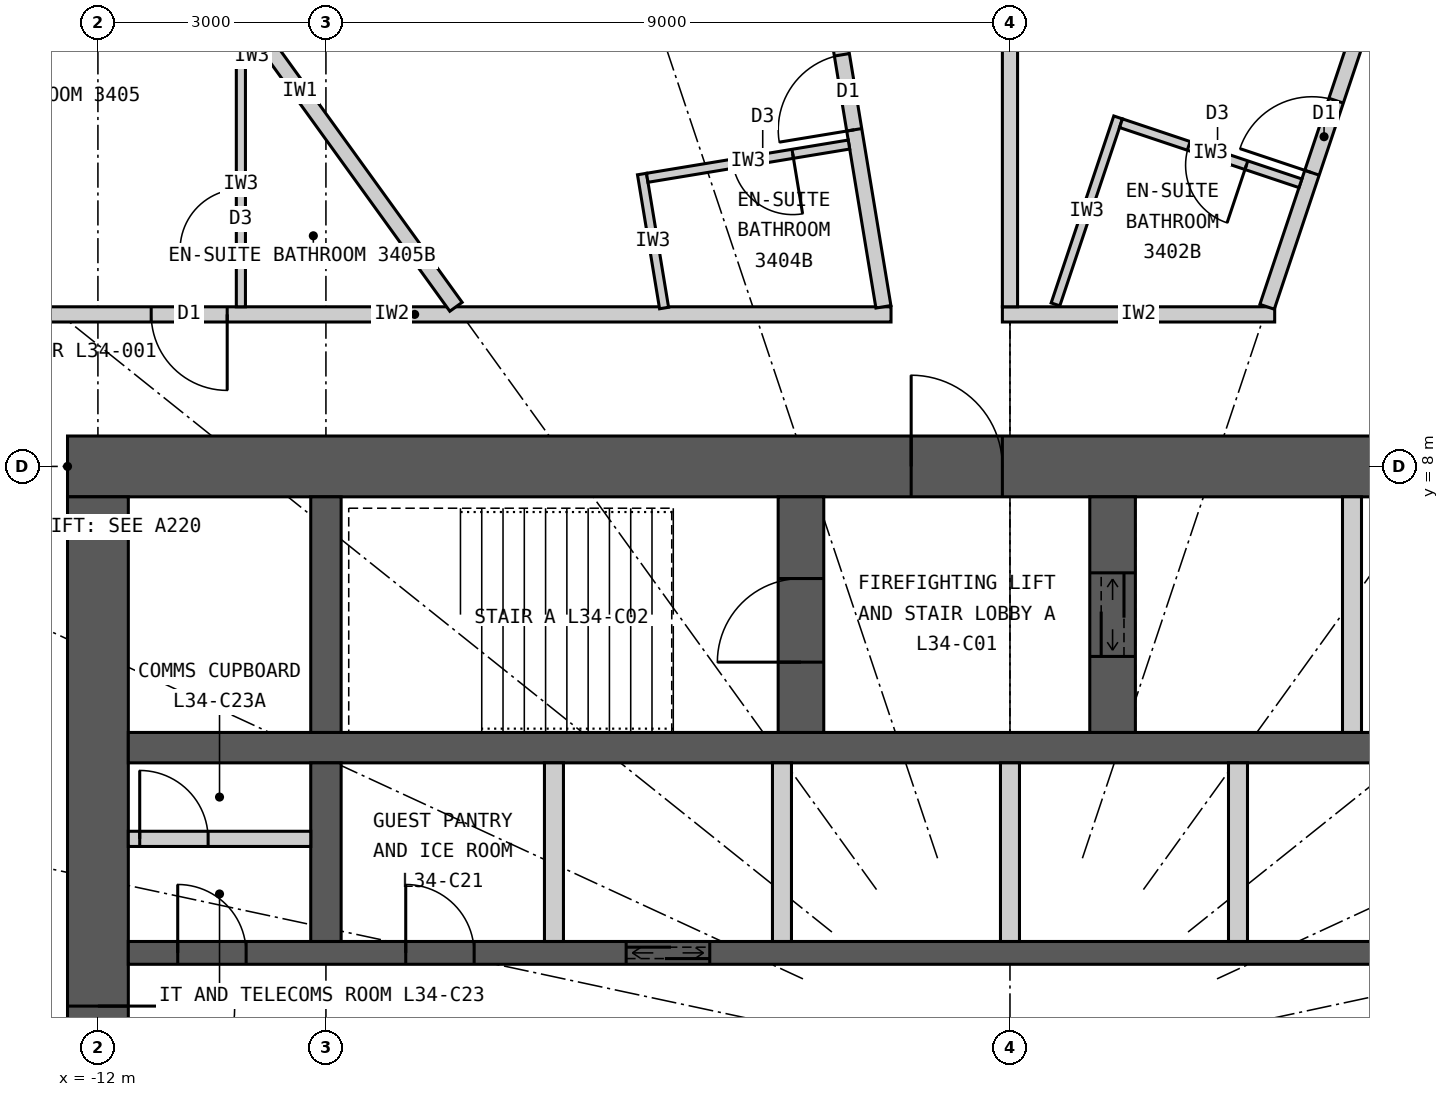
"""IFC4 building model, lengths in metres.
Left out: names, types, materials, properties, quantities, classifications, styles, units other than length and angle.
Written with IfcOpenShell. Run it as: python <this file> out.ifc"""

import sys

from ifc_helpers import new_model, si_unit, direction, frame, frame_2d, origin, place, context, subcontext, project, spatial, rectangle, extrude, element, fill, save


model = new_model("IFC4")
c1 = context("Model", 3, precision=1e-05, world=origin(), true_north=direction((0.0, 1.0)))
c2 = subcontext(c1, "Body", "Model", "MODEL_VIEW")
j1 = project(units=[si_unit("LENGTHUNIT", "METRE"), si_unit("PLANEANGLEUNIT", "RADIAN")], contexts=[c1])
p1 = place(None, origin())
s1 = spatial("IfcSite", under=j1, at=p1, CompositionType="ELEMENT")
p2 = place(p1, origin())
s2 = spatial("IfcBuilding", under=s1, at=p2, CompositionType="ELEMENT")
p3 = place(p2, frame((0.0, 0.0, 132.0)))
s3 = spatial("IfcBuildingStorey", under=s2, at=p3, CompositionType="ELEMENT", Elevation=132.0)
p4 = place(p3, frame((-12.4, 8.0, 0.0), z_axis=(0.0, 0.0, 1.0), x_axis=(1.0, 0.0, 0.0)))
e1 = element("IfcWall", 1, at=p4, inside=s3, PredefinedType="SHEAR", context=c2, shape_type="SweptSolid", body=[
    extrude(rectangle(XDim=24.8, YDim=0.8, at=frame_2d((12.4, 0.0))), origin(), (0.0, 0.0, 1.0), 3.3),
])
p5 = place(p4, frame((11.1, 0.0, 0.0)))
e2 = element("IfcOpeningElement", 2, at=p5, cuts=e1, PredefinedType="OPENING", context=c2, shape_type="SweptSolid", body=[
    extrude(rectangle(XDim=1.2, YDim=2.2, at=frame_2d((0.6, 1.1))), frame((0.0, 0.41, 0.0), z_axis=(0.0, -1.0, 0.0), x_axis=(1.0, 0.0, 0.0)), (0.0, 0.0, 1.0), 0.82),
])
p6 = place(p4, frame((18.7, 0.0, 0.0)))
e3 = element("IfcOpeningElement", 3, at=p6, cuts=e1, PredefinedType="OPENING", context=c2, shape_type="SweptSolid", body=[
    extrude(rectangle(XDim=0.9, YDim=2.2, at=frame_2d((0.45, 1.1))), frame((0.0, 0.41, 0.0), z_axis=(0.0, -1.0, 0.0), x_axis=(1.0, 0.0, 0.0)), (0.0, 0.0, 1.0), 0.82),
])
p7 = place(p3, frame((-12.0, 7.6, 0.0), z_axis=(0.0, 0.0, 1.0), x_axis=(0.0, -1.0, 0.0)))
e4 = element("IfcWall", 4, at=p7, inside=s3, PredefinedType="SHEAR", context=c2, shape_type="SweptSolid", body=[
    extrude(rectangle(XDim=15.2, YDim=0.8, at=frame_2d((7.6, 0.0))), origin(), (0.0, 0.0, 1.0), 3.3),
])
p8 = place(p7, frame((6.7, 0.0, 0.0)))
e5 = element("IfcOpeningElement", 5, at=p8, cuts=e4, PredefinedType="OPENING", context=c2, shape_type="SweptSolid", body=[
    extrude(rectangle(XDim=1.8, YDim=2.2, at=frame_2d((0.9, 1.1))), frame((0.0, 0.41, 0.0), z_axis=(0.0, -1.0, 0.0), x_axis=(1.0, 0.0, 0.0)), (0.0, 0.0, 1.0), 0.82),
])
p9 = place(p3, frame((-11.6, 4.3, 0.0), z_axis=(0.0, 0.0, 1.0), x_axis=(1.0, 0.0, 0.0)))
e6 = element("IfcWall", 6, at=p9, inside=s3, PredefinedType="SHEAR", context=c2, shape_type="SweptSolid", body=[
    extrude(rectangle(XDim=23.2, YDim=0.4, at=frame_2d((11.6, 0.0))), origin(), (0.0, 0.0, 1.0), 3.3),
])
p10 = place(p3, frame((-11.6, 1.6, 0.0), z_axis=(0.0, 0.0, 1.0), x_axis=(1.0, 0.0, 0.0)))
e7 = element("IfcWall", 7, at=p10, inside=s3, PredefinedType="SHEAR", context=c2, shape_type="SweptSolid", body=[
    extrude(rectangle(XDim=23.2, YDim=0.3, at=frame_2d((11.6, 0.0))), origin(), (0.0, 0.0, 1.0), 3.3),
])
p11 = place(p10, frame((6.55, 0.0, 0.0)))
e8 = element("IfcOpeningElement", 8, at=p11, cuts=e7, PredefinedType="OPENING", context=c2, shape_type="SweptSolid", body=[
    extrude(rectangle(XDim=1.1, YDim=2.2, at=frame_2d((0.55, 1.1))), frame((0.0, 0.16, 0.0), z_axis=(0.0, -1.0, 0.0), x_axis=(1.0, 0.0, 0.0)), (0.0, 0.0, 1.0), 0.32),
])
p12 = place(p10, frame((3.65, 0.0, 0.0)))
e9 = element("IfcOpeningElement", 9, at=p12, cuts=e7, PredefinedType="OPENING", context=c2, shape_type="SweptSolid", body=[
    extrude(rectangle(XDim=0.9, YDim=2.2, at=frame_2d((0.45, 1.1))), frame((0.0, 0.16, 0.0), z_axis=(0.0, -1.0, 0.0), x_axis=(1.0, 0.0, 0.0)), (0.0, 0.0, 1.0), 0.32),
])
p13 = place(p10, frame((21.65, 0.0, 0.0)))
e10 = element("IfcOpeningElement", 10, at=p13, cuts=e7, PredefinedType="OPENING", context=c2, shape_type="SweptSolid", body=[
    extrude(rectangle(XDim=0.9, YDim=2.2, at=frame_2d((0.45, 1.1))), frame((0.0, 0.16, 0.0), z_axis=(0.0, -1.0, 0.0), x_axis=(1.0, 0.0, 0.0)), (0.0, 0.0, 1.0), 0.32),
])
p14 = place(p10, frame((0.65, 0.0, 0.0)))
e11 = element("IfcOpeningElement", 11, at=p14, cuts=e7, PredefinedType="OPENING", context=c2, shape_type="SweptSolid", body=[
    extrude(rectangle(XDim=0.9, YDim=2.2, at=frame_2d((0.45, 1.1))), frame((0.0, 0.16, 0.0), z_axis=(0.0, -1.0, 0.0), x_axis=(1.0, 0.0, 0.0)), (0.0, 0.0, 1.0), 0.32),
])
p15 = place(p3, frame((-9.0, 4.5, 0.0), z_axis=(0.0, 0.0, 1.0), x_axis=(0.0, 1.0, 0.0)))
e12 = element("IfcWall", 12, at=p15, inside=s3, PredefinedType="SHEAR", context=c2, shape_type="SweptSolid", body=[
    extrude(rectangle(XDim=3.1, YDim=0.4, at=frame_2d((1.55, 0.0))), origin(), (0.0, 0.0, 1.0), 3.3),
])
p16 = place(p3, frame((-9.0, 1.75, 0.0), z_axis=(0.0, 0.0, 1.0), x_axis=(0.0, 1.0, 0.0)))
e13 = element("IfcWall", 13, at=p16, inside=s3, PredefinedType="SHEAR", context=c2, shape_type="SweptSolid", body=[
    extrude(rectangle(XDim=2.35, YDim=0.4, at=frame_2d((1.175, 0.0))), origin(), (0.0, 0.0, 1.0), 3.3),
])
p17 = place(p3, frame((-2.75, 4.5, 0.0), z_axis=(0.0, 0.0, 1.0), x_axis=(0.0, 1.0, 0.0)))
e14 = element("IfcWall", 14, at=p17, inside=s3, PredefinedType="SHEAR", context=c2, shape_type="SweptSolid", body=[
    extrude(rectangle(XDim=3.1, YDim=0.6, at=frame_2d((1.55, 0.0))), origin(), (0.0, 0.0, 1.0), 3.3),
])
p18 = place(p17, frame((0.925, 0.0, 0.0)))
e15 = element("IfcOpeningElement", 15, at=p18, cuts=e14, PredefinedType="OPENING", context=c2, shape_type="SweptSolid", body=[
    extrude(rectangle(XDim=1.1, YDim=2.2, at=frame_2d((0.55, 1.1))), frame((0.0, 0.31, 0.0), z_axis=(0.0, -1.0, 0.0), x_axis=(1.0, 0.0, 0.0)), (0.0, 0.0, 1.0), 0.62),
])
p19 = place(p3, frame((1.35, 4.5, 0.0), z_axis=(0.0, 0.0, 1.0), x_axis=(0.0, 1.0, 0.0)))
e16 = element("IfcWall", 16, at=p19, inside=s3, PredefinedType="SHEAR", context=c2, shape_type="SweptSolid", body=[
    extrude(rectangle(XDim=3.1, YDim=0.6, at=frame_2d((1.55, 0.0))), origin(), (0.0, 0.0, 1.0), 3.3),
])
p20 = place(p19, frame((1.0, 0.0, 0.0)))
e17 = element("IfcOpeningElement", 17, at=p20, cuts=e16, PredefinedType="OPENING", context=c2, shape_type="SweptSolid", body=[
    extrude(rectangle(XDim=1.1, YDim=2.2, at=frame_2d((0.55, 1.1))), frame((0.0, 0.31, 0.0), z_axis=(0.0, -1.0, 0.0), x_axis=(1.0, 0.0, 0.0)), (0.0, 0.0, 1.0), 0.62),
])
p21 = place(p3, frame((4.5, 4.5, 0.0), z_axis=(0.0, 0.0, 1.0), x_axis=(0.0, 1.0, 0.0)))
e18 = element("IfcWall", 18, at=p21, inside=s3, PredefinedType="PARTITIONING", context=c2, shape_type="SweptSolid", body=[
    extrude(rectangle(XDim=3.1, YDim=0.25, at=frame_2d((1.55, 0.0))), origin(), (0.0, 0.0, 1.0), 3.3),
])
for number, where, z_axis, x_axis in (
    (19, (-6.0, 1.75, 0.0), (0.0, 0.0, 1.0), (0.0, 1.0, 0.0)),
    (20, (-3.0, 1.75, 0.0), (0.0, 0.0, 1.0), (0.0, 1.0, 0.0)),
    (21, (0.0, 1.75, 0.0), (0.0, 0.0, 1.0), (0.0, 1.0, 0.0)),
    (22, (3.0, 1.75, 0.0), (0.0, 0.0, 1.0), (0.0, 1.0, 0.0)),
):
    element("IfcWall", number, at=place(p3, frame(where, z_axis=z_axis, x_axis=x_axis)), inside=s3, PredefinedType="PARTITIONING", context=c2, shape_type="SweptSolid", body=[
        extrude(rectangle(XDim=2.35, YDim=0.25, at=frame_2d((1.175, 0.0))), origin(), (0.0, 0.0, 1.0), 3.3),
    ])
p22 = place(p3, frame((-14.1, 10.0, 0.0), z_axis=(0.0, 0.0, 1.0), x_axis=(1.0, 0.0, 0.0)))
e23 = element("IfcWall", 23, at=p22, inside=s3, PredefinedType="PARTITIONING", context=c2, shape_type="SweptSolid", body=[
    extrude(rectangle(XDim=12.535, YDim=0.2, at=frame_2d((6.268, 0.0))), origin(), (0.0, 0.0, 1.0), 3.12),
])
p23 = place(p22, frame((2.801, 0.0, 0.0)))
e24 = element("IfcOpeningElement", 24, at=p23, cuts=e23, PredefinedType="OPENING", context=c2, shape_type="SweptSolid", body=[
    extrude(rectangle(XDim=1.0, YDim=2.2, at=frame_2d((0.5, 1.1))), frame((0.0, 0.11, 0.0), z_axis=(0.0, -1.0, 0.0), x_axis=(1.0, 0.0, 0.0)), (0.0, 0.0, 1.0), 0.22),
])
p24 = place(p3, frame((-0.1, 10.0, 0.0), z_axis=(0.0, 0.0, 1.0), x_axis=(1.0, 0.0, 0.0)))
e25 = element("IfcWall", 25, at=p24, inside=s3, PredefinedType="PARTITIONING", context=c2, shape_type="SweptSolid", body=[
    extrude(rectangle(XDim=3.583, YDim=0.2, at=frame_2d((1.792, 0.0))), origin(), (0.0, 0.0, 1.0), 3.12),
])
p25 = place(p3, frame((3.383, 10.1, 0.0), z_axis=(0.0, 0.0, 1.0), x_axis=(0.317603705574, 0.948223542318, 0.0)))
e26 = element("IfcWall", 26, at=p25, inside=s3, PredefinedType="PARTITIONING", context=c2, shape_type="SweptSolid", body=[
    extrude(rectangle(XDim=7.823, YDim=0.2, at=frame_2d((3.912, 0.0))), origin(), (0.0, 0.0, 1.0), 2.27),
])
p26 = place(p25, frame((1.86, 0.0, 0.0)))
e27 = element("IfcOpeningElement", 27, at=p26, cuts=e26, PredefinedType="OPENING", context=c2, shape_type="SweptSolid", body=[
    extrude(rectangle(XDim=1.0, YDim=2.2, at=frame_2d((0.5, 1.1))), frame((0.0, 0.11, 0.0), z_axis=(0.0, -1.0, 0.0), x_axis=(1.0, 0.0, 0.0)), (0.0, 0.0, 1.0), 0.22),
])
p27 = place(p3, frame((0.0, 10.1, 0.0), z_axis=(0.0, 0.0, 1.0), x_axis=(0.0, 1.0, 0.0)))
e28 = element("IfcWall", 28, at=p27, inside=s3, PredefinedType="PARTITIONING", context=c2, shape_type="SweptSolid", body=[
    extrude(rectangle(XDim=8.0, YDim=0.2, at=frame_2d((4.0, 0.0))), origin(), (0.0, 0.0, 1.0), 2.27),
])
p28 = place(p3, frame((-1.665, 10.1, 0.0), z_axis=(0.0, 0.0, 1.0), x_axis=(-0.162660519103, 0.986682094459, 0.0)))
e29 = element("IfcWall", 29, at=p28, inside=s3, PredefinedType="PARTITIONING", context=c2, shape_type="SweptSolid", body=[
    extrude(rectangle(XDim=9.111, YDim=0.2, at=frame_2d((4.555, 0.0))), origin(), (0.0, 0.0, 1.0), 3.12),
])
p29 = place(p28, frame((2.36, 0.0, 0.0)))
e30 = element("IfcOpeningElement", 30, at=p29, cuts=e29, PredefinedType="OPENING", context=c2, shape_type="SweptSolid", body=[
    extrude(rectangle(XDim=1.0, YDim=2.2, at=frame_2d((0.5, 1.1))), frame((0.0, 0.11, 0.0), z_axis=(0.0, -1.0, 0.0), x_axis=(1.0, 0.0, 0.0)), (0.0, 0.0, 1.0), 0.22),
])
p30 = place(p3, frame((-7.289, 10.1, 0.0), z_axis=(0.0, 0.0, 1.0), x_axis=(-0.585217367024, 0.81087645997, 0.0)))
e31 = element("IfcWall", 31, at=p30, inside=s3, PredefinedType="PARTITIONING", context=c2, shape_type="SweptSolid", body=[
    extrude(rectangle(XDim=7.016, YDim=0.2, at=frame_2d((3.508, 0.0))), origin(), (0.0, 0.0, 1.0), 2.27),
])
p31 = place(p3, frame((0.599, 10.132, 0.0), z_axis=(0.0, 0.0, 1.0), x_axis=(0.317554522053, 0.948240014724, 0.0)))
e32 = element("IfcWall", 32, at=p31, inside=s3, PredefinedType="PARTITIONING", context=c2, shape_type="SweptSolid", body=[
    extrude(rectangle(XDim=2.594, YDim=0.12, at=frame_2d((1.297, 0.0))), origin(), (0.0, 0.0, 1.0), 3.12),
])
p32 = place(p3, frame((3.822, 11.725, 0.0), z_axis=(0.0, 0.0, 1.0), x_axis=(-0.948231307998, 0.317580519761, 0.0)))
e33 = element("IfcWall", 33, at=p32, inside=s3, PredefinedType="PARTITIONING", context=c2, shape_type="SweptSolid", body=[
    extrude(rectangle(XDim=2.49, YDim=0.12, at=frame_2d((1.245, 0.0))), origin(), (0.0, 0.0, 1.0), 3.12),
])
p33 = place(p32, frame((0.75, 0.0, 0.0)))
e34 = element("IfcOpeningElement", 34, at=p33, cuts=e33, PredefinedType="OPENING", context=c2, shape_type="SweptSolid", body=[
    extrude(rectangle(XDim=0.8, YDim=2.1, at=frame_2d((0.4, 1.05))), frame((0.0, 0.07, 0.0), z_axis=(0.0, -1.0, 0.0), x_axis=(1.0, 0.0, 0.0)), (0.0, 0.0, 1.0), 0.14),
])
p34 = place(p3, frame((-4.551, 10.084, 0.0), z_axis=(0.0, 0.0, 1.0), x_axis=(-0.162625830583, 0.986687812445, 0.0)))
e35 = element("IfcWall", 35, at=p34, inside=s3, PredefinedType="PARTITIONING", context=c2, shape_type="SweptSolid", body=[
    extrude(rectangle(XDim=1.786, YDim=0.12, at=frame_2d((0.893, 0.0))), origin(), (0.0, 0.0, 1.0), 3.12),
])
p35 = place(p3, frame((-2.118, 12.235, 0.0), z_axis=(0.0, 0.0, 1.0), x_axis=(-0.986686682911, -0.16263268357, 0.0)))
e36 = element("IfcWall", 36, at=p35, inside=s3, PredefinedType="PARTITIONING", context=c2, shape_type="SweptSolid", body=[
    extrude(rectangle(XDim=2.69, YDim=0.12, at=frame_2d((1.345, 0.0))), origin(), (0.0, 0.0, 1.0), 3.12),
])
p36 = place(p35, frame((0.75, 0.0, 0.0)))
e37 = element("IfcOpeningElement", 37, at=p36, cuts=e36, PredefinedType="OPENING", context=c2, shape_type="SweptSolid", body=[
    extrude(rectangle(XDim=0.8, YDim=2.1, at=frame_2d((0.4, 1.05))), frame((0.0, 0.07, 0.0), z_axis=(0.0, -1.0, 0.0), x_axis=(1.0, 0.0, 0.0)), (0.0, 0.0, 1.0), 0.14),
])
p37 = place(p3, frame((-9.771, 13.4, 0.0), z_axis=(0.0, 0.0, 1.0), x_axis=(-1.0, 0.0, 0.0)))
e38 = element("IfcWall", 38, at=p37, inside=s3, PredefinedType="PARTITIONING", context=c2, shape_type="SweptSolid", body=[
    extrude(rectangle(XDim=0.408, YDim=0.12, at=frame_2d((0.204, 0.0))), origin(), (0.0, 0.0, 1.0), 3.12),
])
p38 = place(p3, frame((-10.119, 10.1, 0.0), z_axis=(0.0, 0.0, 1.0), x_axis=(0.0, 1.0, 0.0)))
e39 = element("IfcWall", 39, at=p38, inside=s3, PredefinedType="PARTITIONING", context=c2, shape_type="SweptSolid", body=[
    extrude(rectangle(XDim=3.24, YDim=0.12, at=frame_2d((1.62, 0.0))), origin(), (0.0, 0.0, 1.0), 3.12),
])
p39 = place(p38, frame((0.75, 0.0, 0.0)))
e40 = element("IfcOpeningElement", 40, at=p39, cuts=e39, PredefinedType="OPENING", context=c2, shape_type="SweptSolid", body=[
    extrude(rectangle(XDim=0.8, YDim=2.1, at=frame_2d((0.4, 1.05))), frame((0.0, 0.07, 0.0), z_axis=(0.0, -1.0, 0.0), x_axis=(1.0, 0.0, 0.0)), (0.0, 0.0, 1.0), 0.14),
])
p40 = place(p3, frame((-11.6, 3.1, 0.0), z_axis=(0.0, 0.0, 1.0), x_axis=(1.0, 0.0, 0.0)))
e41 = element("IfcWall", 41, at=p40, inside=s3, PredefinedType="PARTITIONING", context=c2, shape_type="SweptSolid", body=[
    extrude(rectangle(XDim=2.4, YDim=0.2, at=frame_2d((1.2, 0.0))), origin(), (0.0, 0.0, 1.0), 3.12),
])
p41 = place(p40, frame((0.15, 0.0, 0.0)))
e42 = element("IfcOpeningElement", 42, at=p41, cuts=e41, PredefinedType="OPENING", context=c2, shape_type="SweptSolid", body=[
    extrude(rectangle(XDim=0.9, YDim=2.2, at=frame_2d((0.45, 1.1))), frame((0.0, 0.11, 0.0), z_axis=(0.0, -1.0, 0.0), x_axis=(1.0, 0.0, 0.0)), (0.0, 0.0, 1.0), 0.22),
])
p42 = place(p33, origin())
e43 = element("IfcDoor", 43, at=p42, inside=s3, OperationType="SINGLE_SWING_LEFT", PredefinedType="DOOR", context=c2, shape_type="SweptSolid", body=[
    extrude(rectangle(XDim=0.8, YDim=2.1, at=frame_2d((0.4, 1.05))), frame((0.0, 0.025, 0.0), z_axis=(0.0, -1.0, 0.0), x_axis=(1.0, 0.0, 0.0)), (0.0, 0.0, 1.0), 0.05),
])
fill(e34, e43)
p43 = place(p26, origin())
e44 = element("IfcDoor", 44, at=p43, inside=s3, OperationType="SINGLE_SWING_LEFT", PredefinedType="DOOR", context=c2, shape_type="SweptSolid", body=[
    extrude(rectangle(XDim=1.0, YDim=2.2, at=frame_2d((0.5, 1.1))), frame((0.0, 0.025, 0.0), z_axis=(0.0, -1.0, 0.0), x_axis=(1.0, 0.0, 0.0)), (0.0, 0.0, 1.0), 0.05),
])
fill(e27, e44)
p44 = place(p36, origin())
e45 = element("IfcDoor", 45, at=p44, inside=s3, OperationType="SINGLE_SWING_LEFT", PredefinedType="DOOR", context=c2, shape_type="SweptSolid", body=[
    extrude(rectangle(XDim=0.8, YDim=2.1, at=frame_2d((0.4, 1.05))), frame((0.0, 0.025, 0.0), z_axis=(0.0, -1.0, 0.0), x_axis=(1.0, 0.0, 0.0)), (0.0, 0.0, 1.0), 0.05),
])
fill(e37, e45)
p45 = place(p29, origin())
e46 = element("IfcDoor", 46, at=p45, inside=s3, OperationType="SINGLE_SWING_LEFT", PredefinedType="DOOR", context=c2, shape_type="SweptSolid", body=[
    extrude(rectangle(XDim=1.0, YDim=2.2, at=frame_2d((0.5, 1.1))), frame((0.0, 0.025, 0.0), z_axis=(0.0, -1.0, 0.0), x_axis=(1.0, 0.0, 0.0)), (0.0, 0.0, 1.0), 0.05),
])
fill(e30, e46)
p46 = place(p39, origin())
e47 = element("IfcDoor", 47, at=p46, inside=s3, OperationType="SINGLE_SWING_LEFT", PredefinedType="DOOR", context=c2, shape_type="SweptSolid", body=[
    extrude(rectangle(XDim=0.8, YDim=2.1, at=frame_2d((0.4, 1.05))), frame((0.0, 0.025, 0.0), z_axis=(0.0, -1.0, 0.0), x_axis=(1.0, 0.0, 0.0)), (0.0, 0.0, 1.0), 0.05),
])
fill(e40, e47)
p47 = place(p23, origin())
e48 = element("IfcDoor", 48, at=p47, inside=s3, OperationType="SINGLE_SWING_RIGHT", PredefinedType="DOOR", context=c2, shape_type="SweptSolid", body=[
    extrude(rectangle(XDim=1.0, YDim=2.2, at=frame_2d((0.5, 1.1))), frame((0.0, 0.025, 0.0), z_axis=(0.0, -1.0, 0.0), x_axis=(1.0, 0.0, 0.0)), (0.0, 0.0, 1.0), 0.05),
])
fill(e24, e48)
p48 = place(p5, origin())
e49 = element("IfcDoor", 49, at=p48, inside=s3, OperationType="SINGLE_SWING_LEFT", PredefinedType="DOOR", context=c2, shape_type="SweptSolid", body=[
    extrude(rectangle(XDim=1.2, YDim=2.2, at=frame_2d((0.6, 1.1))), frame((0.0, 0.025, 0.0), z_axis=(0.0, -1.0, 0.0), x_axis=(1.0, 0.0, 0.0)), (0.0, 0.0, 1.0), 0.05),
])
fill(e2, e49)
p49 = place(p18, origin())
e50 = element("IfcDoor", 50, at=p49, inside=s3, OperationType="SINGLE_SWING_LEFT", PredefinedType="DOOR", context=c2, shape_type="SweptSolid", body=[
    extrude(rectangle(XDim=1.1, YDim=2.2, at=frame_2d((0.55, 1.1))), frame((0.0, 0.025, 0.0), z_axis=(0.0, -1.0, 0.0), x_axis=(1.0, 0.0, 0.0)), (0.0, 0.0, 1.0), 0.05),
])
fill(e15, e50)
p50 = place(p20, origin())
e51 = element("IfcDoor", 51, at=p50, inside=s3, OperationType="DOUBLE_DOOR_SLIDING", PredefinedType="DOOR", context=c2, shape_type="SweptSolid", body=[
    extrude(rectangle(XDim=1.1, YDim=2.2, at=frame_2d((0.55, 1.1))), frame((0.0, 0.025, 0.0), z_axis=(0.0, -1.0, 0.0), x_axis=(1.0, 0.0, 0.0)), (0.0, 0.0, 1.0), 0.05),
])
fill(e17, e51)
p51 = place(p11, origin())
e52 = element("IfcDoor", 52, at=p51, inside=s3, OperationType="DOUBLE_DOOR_SLIDING", PredefinedType="DOOR", context=c2, shape_type="SweptSolid", body=[
    extrude(rectangle(XDim=1.1, YDim=2.2, at=frame_2d((0.55, 1.1))), frame((0.0, 0.025, 0.0), z_axis=(0.0, -1.0, 0.0), x_axis=(1.0, 0.0, 0.0)), (0.0, 0.0, 1.0), 0.05),
])
fill(e8, e52)
p52 = place(p12, origin())
e53 = element("IfcDoor", 53, at=p52, inside=s3, OperationType="SINGLE_SWING_LEFT", PredefinedType="DOOR", context=c2, shape_type="SweptSolid", body=[
    extrude(rectangle(XDim=0.9, YDim=2.2, at=frame_2d((0.45, 1.1))), frame((0.0, 0.025, 0.0), z_axis=(0.0, -1.0, 0.0), x_axis=(1.0, 0.0, 0.0)), (0.0, 0.0, 1.0), 0.05),
])
fill(e9, e53)
p53 = place(p14, origin())
e54 = element("IfcDoor", 54, at=p53, inside=s3, OperationType="SINGLE_SWING_LEFT", PredefinedType="DOOR", context=c2, shape_type="SweptSolid", body=[
    extrude(rectangle(XDim=0.9, YDim=2.2, at=frame_2d((0.45, 1.1))), frame((0.0, 0.025, 0.0), z_axis=(0.0, -1.0, 0.0), x_axis=(1.0, 0.0, 0.0)), (0.0, 0.0, 1.0), 0.05),
])
fill(e11, e54)
p54 = place(p41, origin())
e55 = element("IfcDoor", 55, at=p54, inside=s3, OperationType="SINGLE_SWING_LEFT", PredefinedType="DOOR", context=c2, shape_type="SweptSolid", body=[
    extrude(rectangle(XDim=0.9, YDim=2.2, at=frame_2d((0.45, 1.1))), frame((0.0, 0.025, 0.0), z_axis=(0.0, -1.0, 0.0), x_axis=(1.0, 0.0, 0.0)), (0.0, 0.0, 1.0), 0.05),
])
fill(e42, e55)
p55 = place(p8, origin())
e56 = element("IfcDoor", 56, at=p55, inside=s3, OperationType="DOUBLE_DOOR_DOUBLE_SWING", PredefinedType="DOOR", context=c2, shape_type="SweptSolid", body=[
    extrude(rectangle(XDim=1.8, YDim=2.2, at=frame_2d((0.9, 1.1))), frame((0.0, 0.025, 0.0), z_axis=(0.0, -1.0, 0.0), x_axis=(1.0, 0.0, 0.0)), (0.0, 0.0, 1.0), 0.05),
])
fill(e5, e56)
save(model, sys.argv[1])
